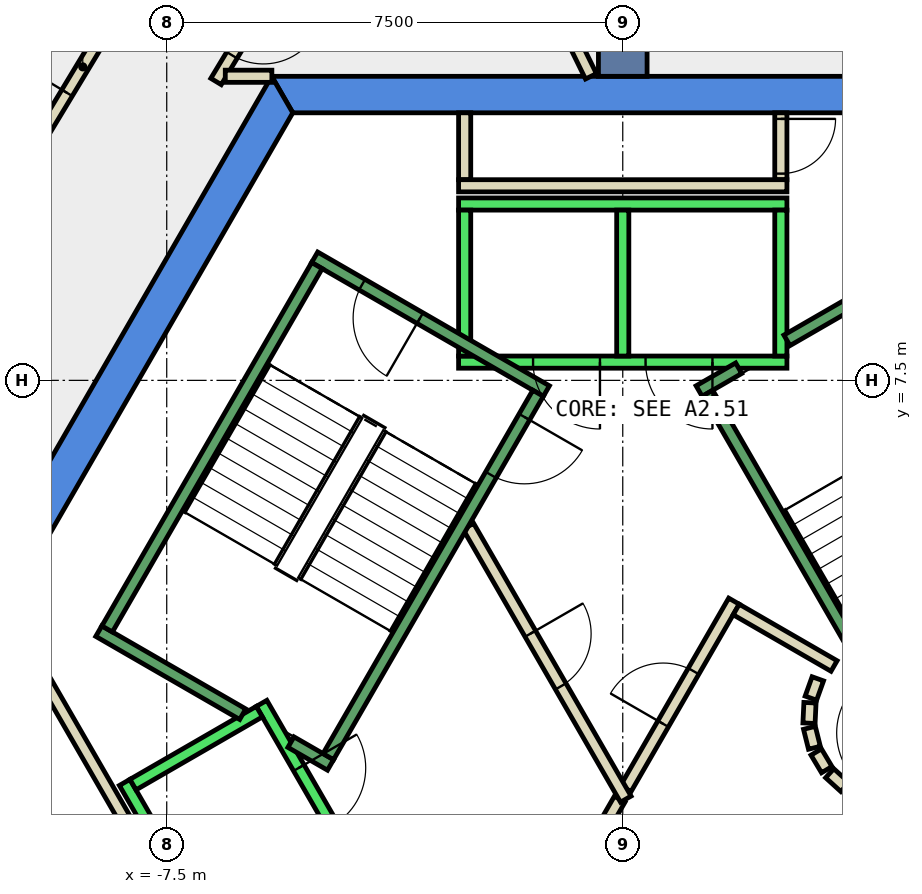
"""IFC4 building model, lengths in metres.
Left out: names, types, materials, properties, quantities, classifications, styles, units other than length and angle.
Written with IfcOpenShell. Run it as: python <this file> out.ifc"""

import sys

from ifc_helpers import new_model, si_unit, direction, frame, frame_2d, origin, place, context, subcontext, project, spatial, polyline, rectangle, outline, extrude, element, fill, save


model = new_model("IFC4")
c1 = context("Model", 3, precision=1e-05, world=origin(), true_north=direction((0.0, 1.0)))
c2 = subcontext(c1, "Body", "Model", "MODEL_VIEW")
j1 = project(units=[si_unit("LENGTHUNIT", "METRE"), si_unit("PLANEANGLEUNIT", "RADIAN")], contexts=[c1])
p1 = place(None, origin())
s1 = spatial("IfcSite", under=j1, at=p1, CompositionType="ELEMENT")
p2 = place(p1, origin())
s2 = spatial("IfcBuilding", under=s1, at=p2, CompositionType="ELEMENT")
p3 = place(p2, frame((0.0, 0.0, 245.0)))
s3 = spatial("IfcBuildingStorey", under=s2, at=p3, CompositionType="ELEMENT", Elevation=245.0)
p4 = place(p3, frame((0.0, 0.0, -0.34)))
e1 = element("IfcWall", 1, at=p4, inside=s3, PredefinedType="SHEAR", context=c2, shape_type="SweptSolid", body=[
    extrude(outline(polyline([(5.774, 12.5), (-5.774, 12.5), (-5.427, 11.9), (5.427, 11.9), (5.774, 12.5)])), origin(), (0.0, 0.0, 1.0), 3.6),
])
p5 = place(p3, frame((0.0, 0.0, -0.34)))
e2 = element("IfcWall", 2, at=p5, inside=s3, PredefinedType="SHEAR", context=c2, shape_type="SweptSolid", body=[
    extrude(outline(polyline([(-10.535, 4.253), (-10.015, 3.953), (-5.427, 11.9), (-5.774, 12.5), (-10.535, 4.253)])), origin(), (0.0, 0.0, 1.0), 3.6),
])
p6 = place(p3, frame((0.0, 0.0, -0.34)))
e3 = element("IfcWall", 3, at=p6, inside=s3, PredefinedType="SHEAR", context=c2, shape_type="SweptSolid", body=[
    extrude(outline(polyline([(-11.547, 2.5), (-5.774, -7.5), (-5.427, -6.9), (-10.854, 2.5), (-11.547, 2.5)])), origin(), (0.0, 0.0, 1.0), 3.6),
])
p7 = place(p3, frame((0.0, 12.5, -0.34), z_axis=(0.0, 0.0, 1.0), x_axis=(0.0, 1.0, 0.0)))
e4 = element("IfcWall", 4, at=p7, inside=s3, PredefinedType="SHEAR", context=c2, shape_type="SweptSolid", body=[
    extrude(rectangle(XDim=9.0, YDim=0.8, at=frame_2d((4.5, 0.0))), origin(), (0.0, 0.0, 1.0), 3.6),
])
p8 = place(p3, frame((-0.523, 12.5, 0.0), z_axis=(0.0, 0.0, 1.0), x_axis=(-0.440503659888, 0.897750814884, 0.0)))
e5 = element("IfcWall", 5, at=p8, inside=s3, PredefinedType="PARTITIONING", context=c2, shape_type="SweptSolid", body=[
    extrude(rectangle(XDim=1.793, YDim=0.2, at=frame_2d((0.897, 0.0))), origin(), (0.0, 0.0, 1.0), 3.26),
])
p9 = place(p3, frame((-5.65, 14.136, 0.0), z_axis=(0.0, 0.0, 1.0), x_axis=(-0.516869099034, -0.856064445275, 0.0)))
e6 = element("IfcWall", 6, at=p9, inside=s3, PredefinedType="PARTITIONING", context=c2, shape_type="SweptSolid", body=[
    extrude(rectangle(XDim=2.01, YDim=0.2, at=frame_2d((1.005, 0.0))), origin(), (0.0, 0.0, 1.0), 3.26),
])
p10 = place(p9, frame((0.505, 0.0, 0.0)))
e7 = element("IfcOpeningElement", 7, at=p10, cuts=e6, PredefinedType="OPENING", context=c2, shape_type="SweptSolid", body=[
    extrude(rectangle(XDim=1.0, YDim=2.1, at=frame_2d((0.5, 1.05))), frame((0.0, 0.11, 0.0), z_axis=(0.0, -1.0, 0.0), x_axis=(1.0, 0.0, 0.0)), (0.0, 0.0, 1.0), 0.22),
])
p11 = place(p3, frame((-6.537, 12.501, 0.0), z_axis=(0.0, 0.0, 1.0), x_axis=(1.0, 0.0, 0.0)))
e8 = element("IfcWall", 8, at=p11, inside=s3, PredefinedType="PARTITIONING", context=c2, shape_type="SweptSolid", body=[
    extrude(rectangle(XDim=0.766, YDim=0.2, at=frame_2d((0.383, 0.0))), origin(), (0.0, 0.0, 1.0), 3.26),
])
p12 = place(p3, frame((-10.576, 9.849, 0.0), z_axis=(0.0, 0.0, 1.0), x_axis=(0.517026085378, 0.855969641423, 0.0)))
e9 = element("IfcWall", 9, at=p12, inside=s3, PredefinedType="PARTITIONING", context=c2, shape_type="SweptSolid", body=[
    extrude(rectangle(XDim=6.408, YDim=0.2, at=frame_2d((3.204, 0.0))), origin(), (0.0, 0.0, 1.0), 3.26),
])
p13 = place(p12, frame((2.779, 0.0, 0.0)))
e10 = element("IfcOpeningElement", 10, at=p13, cuts=e9, PredefinedType="OPENING", context=c2, shape_type="SweptSolid", body=[
    extrude(rectangle(XDim=1.0, YDim=2.1, at=frame_2d((0.5, 1.05))), frame((0.0, 0.11, 0.0), z_axis=(0.0, -1.0, 0.0), x_axis=(1.0, 0.0, 0.0)), (0.0, 0.0, 1.0), 0.22),
])
p14 = place(p3, frame((-2.6, 10.8, 0.0), z_axis=(0.0, 0.0, 1.0), x_axis=(0.0, 1.0, 0.0)))
e11 = element("IfcWall", 11, at=p14, inside=s3, PredefinedType="PARTITIONING", context=c2, shape_type="SweptSolid", body=[
    extrude(rectangle(XDim=1.1, YDim=0.2, at=frame_2d((0.55, 0.0))), origin(), (0.0, 0.0, 1.0), 3.26),
])
p15 = place(p3, frame((2.6, 11.9, 0.0), z_axis=(0.0, 0.0, 1.0), x_axis=(0.0, -1.0, 0.0)))
e12 = element("IfcWall", 12, at=p15, inside=s3, PredefinedType="PARTITIONING", context=c2, shape_type="SweptSolid", body=[
    extrude(rectangle(XDim=1.1, YDim=0.2, at=frame_2d((0.55, 0.0))), origin(), (0.0, 0.0, 1.0), 3.26),
])
p16 = place(p15, frame((0.1, 0.0, 0.0)))
e13 = element("IfcOpeningElement", 13, at=p16, cuts=e12, PredefinedType="OPENING", context=c2, shape_type="SweptSolid", body=[
    extrude(rectangle(XDim=0.9, YDim=2.1, at=frame_2d((0.45, 1.05))), frame((0.0, 0.11, 0.0), z_axis=(0.0, -1.0, 0.0), x_axis=(1.0, 0.0, 0.0)), (0.0, 0.0, 1.0), 0.22),
])
p17 = place(p3, frame((2.7, 10.7, 0.0), z_axis=(0.0, 0.0, 1.0), x_axis=(-1.0, 0.0, 0.0)))
e14 = element("IfcWall", 14, at=p17, inside=s3, PredefinedType="PARTITIONING", context=c2, shape_type="SweptSolid", body=[
    extrude(rectangle(XDim=5.4, YDim=0.2, at=frame_2d((2.7, 0.0))), origin(), (0.0, 0.0, 1.0), 3.26),
])
p18 = place(p3, frame((-9.751, 2.99, 0.0), z_axis=(0.0, 0.0, 1.0), x_axis=(0.500012163284, -0.866018381195, 0.0)))
e15 = element("IfcWall", 15, at=p18, inside=s3, PredefinedType="PARTITIONING", context=c2, shape_type="SweptSolid", body=[
    extrude(rectangle(XDim=8.0, YDim=0.2, at=frame_2d((4.0, 0.0))), origin(), (0.0, 0.0, 1.0), 3.26),
])
p19 = place(p3, frame((-0.982, -1.0, 0.0), z_axis=(0.0, 0.0, 1.0), x_axis=(0.50024047865, 0.865886518847, 0.0)))
e16 = element("IfcWall", 16, at=p19, inside=s3, PredefinedType="PARTITIONING", context=c2, shape_type="SweptSolid", body=[
    extrude(rectangle(XDim=1.863, YDim=0.2, at=frame_2d((0.931, 0.0))), origin(), (0.0, 0.0, 1.0), 3.26),
])
p20 = place(p3, frame((0.05, 0.787, 0.0), z_axis=(0.0, 0.0, 1.0), x_axis=(0.499954076797, 0.866051915934, 0.0)))
e17 = element("IfcWall", 17, at=p20, inside=s3, PredefinedType="PARTITIONING", context=c2, shape_type="SweptSolid", body=[
    extrude(rectangle(XDim=3.558, YDim=0.2, at=frame_2d((1.779, 0.0))), origin(), (0.0, 0.0, 1.0), 3.26),
])
p21 = place(p20, frame((1.229, 0.0, 0.0)))
e18 = element("IfcOpeningElement", 18, at=p21, cuts=e17, PredefinedType="OPENING", context=c2, shape_type="SweptSolid", body=[
    extrude(rectangle(XDim=1.0, YDim=2.1, at=frame_2d((0.5, 1.05))), frame((0.0, 0.11, 0.0), z_axis=(0.0, -1.0, 0.0), x_axis=(1.0, 0.0, 0.0)), (0.0, 0.0, 1.0), 0.22),
])
p22 = place(p3, frame((1.866, 3.732, 0.0), z_axis=(0.0, 0.0, 1.0), x_axis=(0.866043361281, -0.499968895414, 0.0)))
e19 = element("IfcWall", 19, at=p22, inside=s3, PredefinedType="PARTITIONING", context=c2, shape_type="SweptSolid", body=[
    extrude(rectangle(XDim=1.858, YDim=0.2, at=frame_2d((0.929, 0.0))), origin(), (0.0, 0.0, 1.0), 3.26),
])
p23 = place(p3, frame((3.208, 2.592, 0.0), z_axis=(0.0, 0.0, 1.0), x_axis=(-0.337388820924, -0.941365382578, 0.0)))
e20 = element("IfcWall", 20, at=p23, inside=s3, PredefinedType="PARTITIONING", context=c2, shape_type="SweptSolid", body=[
    extrude(rectangle(XDim=0.338, YDim=0.2, at=frame_2d((0.169, 0.0))), origin(), (0.0, 0.0, 1.0), 3.26),
])
p24 = place(p3, frame((3.079, 2.199, 0.0), z_axis=(0.0, 0.0, 1.0), x_axis=(-0.047771483479, -0.998858290933, 0.0)))
e21 = element("IfcWall", 21, at=p24, inside=s3, PredefinedType="PARTITIONING", context=c2, shape_type="SweptSolid", body=[
    extrude(rectangle(XDim=0.337, YDim=0.2, at=frame_2d((0.169, 0.0))), origin(), (0.0, 0.0, 1.0), 3.26),
])
p25 = place(p3, frame((3.07, 1.786, 0.0), z_axis=(0.0, 0.0, 1.0), x_axis=(0.242705583207, -0.970099994784, 0.0)))
e22 = element("IfcWall", 22, at=p25, inside=s3, PredefinedType="PARTITIONING", context=c2, shape_type="SweptSolid", body=[
    extrude(rectangle(XDim=0.338, YDim=0.2, at=frame_2d((0.169, 0.0))), origin(), (0.0, 0.0, 1.0), 3.26),
])
for number, where, z_axis, x_axis in (
    (23, (3.182, 1.388, 0.0), (0.0, 0.0, 1.0), (0.512, -0.859, 0.0)),
    (24, (3.404, 1.039, 0.0), (0.0, 0.0, 1.0), (0.74, -0.672, 0.0)),
):
    element("IfcWall", number, at=place(p3, frame(where, z_axis=z_axis, x_axis=x_axis)), inside=s3, PredefinedType="PARTITIONING", context=c2, shape_type="SweptSolid", body=[
        extrude(rectangle(XDim=0.338, YDim=0.2, at=frame_2d((0.169, 0.0))), origin(), (0.0, 0.0, 1.0), 3.26),
    ])
p26 = place(p3, frame((-2.54, 5.1, 0.0), z_axis=(0.0, 0.0, 1.0), x_axis=(0.499925051871, -0.866068670783, 0.0)))
e25 = element("IfcWall", 25, at=p26, inside=s3, PredefinedType="PARTITIONING", context=c2, shape_type="SweptSolid", body=[
    extrude(rectangle(XDim=5.181, YDim=0.2, at=frame_2d((2.59, 0.0))), origin(), (0.0, 0.0, 1.0), 3.26),
])
p27 = place(p26, frame((2.04, 0.0, 0.0)))
e26 = element("IfcOpeningElement", 26, at=p27, cuts=e25, PredefinedType="OPENING", context=c2, shape_type="SweptSolid", body=[
    extrude(rectangle(XDim=1.0, YDim=2.1, at=frame_2d((0.5, 1.05))), frame((0.0, 0.11, 0.0), z_axis=(0.0, -1.0, 0.0), x_axis=(1.0, 0.0, 0.0)), (0.0, 0.0, 1.0), 0.22),
])
p28 = place(p3, frame((2.7, 7.8, 0.0), z_axis=(0.0, 0.0, 1.0), x_axis=(-1.0, 0.0, 0.0)))
e27 = element("IfcWall", 27, at=p28, inside=s3, PredefinedType="STANDARD", context=c2, shape_type="SweptSolid", body=[
    extrude(rectangle(XDim=5.4, YDim=0.2, at=frame_2d((2.7, 0.0))), origin(), (0.0, 0.0, 1.0), 3.26),
])
p29 = place(p28, frame((1.225, 0.0, 0.0)))
e28 = element("IfcOpeningElement", 28, at=p29, cuts=e27, PredefinedType="OPENING", context=c2, shape_type="SweptSolid", body=[
    extrude(rectangle(XDim=1.1, YDim=2.1, at=frame_2d((0.55, 1.05))), frame((0.0, 0.11, 0.0), z_axis=(0.0, -1.0, 0.0), x_axis=(1.0, 0.0, 0.0)), (0.0, 0.0, 1.0), 0.22),
])
p30 = place(p28, frame((3.075, 0.0, 0.0)))
e29 = element("IfcOpeningElement", 29, at=p30, cuts=e27, PredefinedType="OPENING", context=c2, shape_type="SweptSolid", body=[
    extrude(rectangle(XDim=1.1, YDim=2.1, at=frame_2d((0.55, 1.05))), frame((0.0, 0.11, 0.0), z_axis=(0.0, -1.0, 0.0), x_axis=(1.0, 0.0, 0.0)), (0.0, 0.0, 1.0), 0.22),
])
p31 = place(p3, frame((2.7, 10.4, 0.0), z_axis=(0.0, 0.0, 1.0), x_axis=(-1.0, 0.0, 0.0)))
e30 = element("IfcWall", 30, at=p31, inside=s3, PredefinedType="STANDARD", context=c2, shape_type="SweptSolid", body=[
    extrude(rectangle(XDim=5.4, YDim=0.2, at=frame_2d((2.7, 0.0))), origin(), (0.0, 0.0, 1.0), 3.26),
])
for number, where, z_axis, x_axis in (
    (31, (2.6, 7.9, 0.0), (0.0, 0.0, 1.0), (0.0, 1.0, 0.0)),
    (32, (0.0, 7.9, 0.0), (0.0, 0.0, 1.0), (0.0, 1.0, 0.0)),
    (33, (-2.6, 7.9, 0.0), (0.0, 0.0, 1.0), (0.0, 1.0, 0.0)),
):
    element("IfcWall", number, at=place(p3, frame(where, z_axis=z_axis, x_axis=x_axis)), inside=s3, PredefinedType="STANDARD", context=c2, shape_type="SweptSolid", body=[
        extrude(rectangle(XDim=2.4, YDim=0.2, at=frame_2d((1.2, 0.0))), origin(), (0.0, 0.0, 1.0), 3.26),
    ])
p32 = place(p3, frame((-5.94, 2.188, 0.0), z_axis=(0.0, 0.0, 1.0), x_axis=(0.500034260056, -0.866005622828, 0.0)))
e34 = element("IfcWall", 34, at=p32, inside=s3, PredefinedType="STANDARD", context=c2, shape_type="SweptSolid", body=[
    extrude(rectangle(XDim=5.399, YDim=0.2, at=frame_2d((2.7, 0.0))), origin(), (0.0, 0.0, 1.0), 3.26),
])
p33 = place(p32, frame((3.075, 0.0, 0.0)))
e35 = element("IfcOpeningElement", 35, at=p33, cuts=e34, PredefinedType="OPENING", context=c2, shape_type="SweptSolid", body=[
    extrude(rectangle(XDim=1.1, YDim=2.1, at=frame_2d((0.55, 1.05))), frame((0.0, 0.11, 0.0), z_axis=(0.0, -1.0, 0.0), x_axis=(1.0, 0.0, 0.0)), (0.0, 0.0, 1.0), 0.22),
])
p34 = place(p32, frame((1.225, 0.0, 0.0)))
e36 = element("IfcOpeningElement", 36, at=p34, cuts=e34, PredefinedType="OPENING", context=c2, shape_type="SweptSolid", body=[
    extrude(rectangle(XDim=1.1, YDim=2.1, at=frame_2d((0.55, 1.05))), frame((0.0, 0.11, 0.0), z_axis=(0.0, -1.0, 0.0), x_axis=(1.0, 0.0, 0.0)), (0.0, 0.0, 1.0), 0.22),
])
p35 = place(p3, frame((-8.192, 0.888, 0.0), z_axis=(0.0, 0.0, 1.0), x_axis=(0.500034260056, -0.866005622828, 0.0)))
e37 = element("IfcWall", 37, at=p35, inside=s3, PredefinedType="STANDARD", context=c2, shape_type="SweptSolid", body=[
    extrude(rectangle(XDim=5.399, YDim=0.2, at=frame_2d((2.7, 0.0))), origin(), (0.0, 0.0, 1.0), 3.26),
])
p36 = place(p3, frame((-5.977, 2.052, 0.0), z_axis=(0.0, 0.0, 1.0), x_axis=(-0.865973769406, -0.500089422704, 0.0)))
e38 = element("IfcWall", 38, at=p36, inside=s3, PredefinedType="STANDARD", context=c2, shape_type="SweptSolid", body=[
    extrude(rectangle(XDim=2.399, YDim=0.2, at=frame_2d((1.2, 0.0))), origin(), (0.0, 0.0, 1.0), 3.26),
])
p37 = place(p3, frame((3.24, -2.488, 0.0), z_axis=(0.0, 0.0, 1.0), x_axis=(0.500034260056, 0.866005622828, 0.0)))
e39 = element("IfcWall", 39, at=p37, inside=s3, PredefinedType="STANDARD", context=c2, shape_type="SweptSolid", body=[
    extrude(rectangle(XDim=5.399, YDim=0.2, at=frame_2d((2.7, 0.0))), origin(), (0.0, 0.0, 1.0), 3.26),
])
p38 = place(p37, frame((3.225, 0.0, 0.0)))
e40 = element("IfcOpeningElement", 40, at=p38, cuts=e39, PredefinedType="OPENING", context=c2, shape_type="SweptSolid", body=[
    extrude(rectangle(XDim=1.1, YDim=2.1, at=frame_2d((0.55, 1.05))), frame((0.0, 0.11, 0.0), z_axis=(0.0, -1.0, 0.0), x_axis=(1.0, 0.0, 0.0)), (0.0, 0.0, 1.0), 0.22),
])
p39 = place(p37, frame((1.225, 0.0, 0.0)))
e41 = element("IfcOpeningElement", 41, at=p39, cuts=e39, PredefinedType="OPENING", context=c2, shape_type="SweptSolid", body=[
    extrude(rectangle(XDim=1.1, YDim=2.1, at=frame_2d((0.55, 1.05))), frame((0.0, 0.11, 0.0), z_axis=(0.0, -1.0, 0.0), x_axis=(1.0, 0.0, 0.0)), (0.0, 0.0, 1.0), 0.22),
])
p40 = place(p3, frame((2.7, 8.158, 0.0), z_axis=(0.0, 0.0, 1.0), x_axis=(0.86611865017, 0.499838457731, 0.0)))
e42 = element("IfcWall", 42, at=p40, inside=s3, PredefinedType="STANDARD", context=c2, shape_type="SweptSolid", body=[
    extrude(rectangle(XDim=2.733, YDim=0.2, at=frame_2d((1.366, 0.0))), origin(), (0.0, 0.0, 1.0), 3.26),
])
p41 = place(p3, frame((1.256, 7.324, 0.0), z_axis=(0.0, 0.0, 1.0), x_axis=(0.865915093549, 0.500191014278, 0.0)))
e43 = element("IfcWall", 43, at=p41, inside=s3, PredefinedType="STANDARD", context=c2, shape_type="SweptSolid", body=[
    extrude(rectangle(XDim=0.752, YDim=0.2, at=frame_2d((0.376, 0.0))), origin(), (0.0, 0.0, 1.0), 3.26),
])
p42 = place(p3, frame((4.843, 1.312, 0.0), z_axis=(0.0, 0.0, 1.0), x_axis=(-0.499963383562, 0.866046543262, 0.0)))
e44 = element("IfcWall", 44, at=p42, inside=s3, PredefinedType="STANDARD", context=c2, shape_type="SweptSolid", body=[
    extrude(rectangle(XDim=6.9, YDim=0.2, at=frame_2d((3.45, 0.0))), origin(), (0.0, 0.0, 1.0), 3.26),
])
p43 = place(p42, frame((0.45, 0.0, 0.0)))
e45 = element("IfcOpeningElement", 45, at=p43, cuts=e44, PredefinedType="OPENING", context=c2, shape_type="SweptSolid", body=[
    extrude(rectangle(XDim=1.1, YDim=2.2, at=frame_2d((0.55, 1.1))), frame((0.0, 0.11, 0.0), z_axis=(0.0, -1.0, 0.0), x_axis=(1.0, 0.0, 0.0)), (0.0, 0.0, 1.0), 0.22),
])
p44 = place(p3, frame((-1.256, 7.324, 0.0), z_axis=(0.0, 0.0, 1.0), x_axis=(-0.866046073146, 0.499964197906, 0.0)))
e46 = element("IfcWall", 46, at=p44, inside=s3, PredefinedType="STANDARD", context=c2, shape_type="SweptSolid", body=[
    extrude(rectangle(XDim=4.4, YDim=0.2, at=frame_2d((2.2, 0.0))), origin(), (0.0, 0.0, 1.0), 3.26),
])
p45 = place(p44, frame((2.4, 0.0, 0.0)))
e47 = element("IfcOpeningElement", 47, at=p45, cuts=e46, PredefinedType="OPENING", context=c2, shape_type="SweptSolid", body=[
    extrude(rectangle(XDim=1.1, YDim=2.2, at=frame_2d((0.55, 1.1))), frame((0.0, 0.11, 0.0), z_axis=(0.0, -1.0, 0.0), x_axis=(1.0, 0.0, 0.0)), (0.0, 0.0, 1.0), 0.22),
])
p46 = place(p3, frame((-6.25, 2.01, 0.0), z_axis=(0.0, 0.0, 1.0), x_axis=(-0.86611865017, 0.499838457731, 0.0)))
e48 = element("IfcWall", 48, at=p46, inside=s3, PredefinedType="STANDARD", context=c2, shape_type="SweptSolid", body=[
    extrude(rectangle(XDim=2.733, YDim=0.2, at=frame_2d((1.366, 0.0))), origin(), (0.0, 0.0, 1.0), 3.26),
])
p47 = place(p3, frame((-4.806, 1.176, 0.0), z_axis=(0.0, 0.0, 1.0), x_axis=(-0.866558586415, 0.499075361355, 0.0)))
e49 = element("IfcWall", 49, at=p47, inside=s3, PredefinedType="STANDARD", context=c2, shape_type="SweptSolid", body=[
    extrude(rectangle(XDim=0.751, YDim=0.2, at=frame_2d((0.376, 0.0))), origin(), (0.0, 0.0, 1.0), 3.26),
])
p48 = place(p3, frame((-1.393, 7.288, 0.0), z_axis=(0.0, 0.0, 1.0), x_axis=(-0.499963383562, -0.866046543262, 0.0)))
e50 = element("IfcWall", 50, at=p48, inside=s3, PredefinedType="STANDARD", context=c2, shape_type="SweptSolid", body=[
    extrude(rectangle(XDim=6.9, YDim=0.2, at=frame_2d((3.45, 0.0))), origin(), (0.0, 0.0, 1.0), 3.26),
])
p49 = place(p48, frame((0.45, 0.0, 0.0)))
e51 = element("IfcOpeningElement", 51, at=p49, cuts=e50, PredefinedType="OPENING", context=c2, shape_type="SweptSolid", body=[
    extrude(rectangle(XDim=1.1, YDim=2.2, at=frame_2d((0.55, 1.1))), frame((0.0, 0.11, 0.0), z_axis=(0.0, -1.0, 0.0), x_axis=(1.0, 0.0, 0.0)), (0.0, 0.0, 1.0), 0.22),
])
p50 = place(p3, frame((-5.03, 9.388, 0.0), z_axis=(0.0, 0.0, 1.0), x_axis=(-0.499978703459, -0.866037698999, 0.0)))
e52 = element("IfcWall", 52, at=p50, inside=s3, PredefinedType="STANDARD", context=c2, shape_type="SweptSolid", body=[
    extrude(rectangle(XDim=6.9, YDim=0.2, at=frame_2d((3.45, 0.0))), origin(), (0.0, 0.0, 1.0), 3.26),
])
p51 = place(p13, origin())
e53 = element("IfcDoor", 53, at=p51, inside=s3, OperationType="SINGLE_SWING_LEFT", PredefinedType="DOOR", context=c2, shape_type="SweptSolid", body=[
    extrude(rectangle(XDim=1.0, YDim=2.1, at=frame_2d((0.5, 1.05))), frame((0.0, 0.025, 0.0), z_axis=(0.0, -1.0, 0.0), x_axis=(1.0, 0.0, 0.0)), (0.0, 0.0, 1.0), 0.05),
])
fill(e10, e53)
p52 = place(p10, origin())
e54 = element("IfcDoor", 54, at=p52, inside=s3, OperationType="SINGLE_SWING_LEFT", PredefinedType="DOOR", context=c2, shape_type="SweptSolid", body=[
    extrude(rectangle(XDim=1.0, YDim=2.1, at=frame_2d((0.5, 1.05))), frame((0.0, 0.025, 0.0), z_axis=(0.0, -1.0, 0.0), x_axis=(1.0, 0.0, 0.0)), (0.0, 0.0, 1.0), 0.05),
])
fill(e7, e54)
p53 = place(p21, origin())
e55 = element("IfcDoor", 55, at=p53, inside=s3, OperationType="SINGLE_SWING_RIGHT", PredefinedType="DOOR", context=c2, shape_type="SweptSolid", body=[
    extrude(rectangle(XDim=1.0, YDim=2.1, at=frame_2d((0.5, 1.05))), frame((0.0, 0.025, 0.0), z_axis=(0.0, -1.0, 0.0), x_axis=(1.0, 0.0, 0.0)), (0.0, 0.0, 1.0), 0.05),
])
fill(e18, e55)
p54 = place(p27, origin())
e56 = element("IfcDoor", 56, at=p54, inside=s3, OperationType="SINGLE_SWING_RIGHT", PredefinedType="DOOR", context=c2, shape_type="SweptSolid", body=[
    extrude(rectangle(XDim=1.0, YDim=2.1, at=frame_2d((0.5, 1.05))), frame((0.0, 0.025, 0.0), z_axis=(0.0, -1.0, 0.0), x_axis=(1.0, 0.0, 0.0)), (0.0, 0.0, 1.0), 0.05),
])
fill(e26, e56)
p55 = place(p16, origin())
e57 = element("IfcDoor", 57, at=p55, inside=s3, OperationType="SINGLE_SWING_LEFT", PredefinedType="DOOR", context=c2, shape_type="SweptSolid", body=[
    extrude(rectangle(XDim=0.9, YDim=2.1, at=frame_2d((0.45, 1.05))), frame((0.0, 0.025, 0.0), z_axis=(0.0, -1.0, 0.0), x_axis=(1.0, 0.0, 0.0)), (0.0, 0.0, 1.0), 0.05),
])
fill(e13, e57)
p56 = place(p29, origin())
e58 = element("IfcDoor", 58, at=p56, inside=s3, OperationType="SLIDING_TO_LEFT", PredefinedType="DOOR", context=c2, shape_type="SweptSolid", body=[
    extrude(rectangle(XDim=1.1, YDim=2.1, at=frame_2d((0.55, 1.05))), frame((0.0, 0.025, 0.0), z_axis=(0.0, -1.0, 0.0), x_axis=(1.0, 0.0, 0.0)), (0.0, 0.0, 1.0), 0.05),
])
fill(e28, e58)
p57 = place(p30, origin())
e59 = element("IfcDoor", 59, at=p57, inside=s3, OperationType="SLIDING_TO_LEFT", PredefinedType="DOOR", context=c2, shape_type="SweptSolid", body=[
    extrude(rectangle(XDim=1.1, YDim=2.1, at=frame_2d((0.55, 1.05))), frame((0.0, 0.025, 0.0), z_axis=(0.0, -1.0, 0.0), x_axis=(1.0, 0.0, 0.0)), (0.0, 0.0, 1.0), 0.05),
])
fill(e29, e59)
p58 = place(p34, origin())
e60 = element("IfcDoor", 60, at=p58, inside=s3, OperationType="SLIDING_TO_LEFT", PredefinedType="DOOR", context=c2, shape_type="SweptSolid", body=[
    extrude(rectangle(XDim=1.1, YDim=2.1, at=frame_2d((0.55, 1.05))), frame((0.0, 0.025, 0.0), z_axis=(0.0, -1.0, 0.0), x_axis=(1.0, 0.0, 0.0)), (0.0, 0.0, 1.0), 0.05),
])
fill(e36, e60)
p59 = place(p49, origin())
e61 = element("IfcDoor", 61, at=p59, inside=s3, OperationType="SINGLE_SWING_LEFT", PredefinedType="DOOR", context=c2, shape_type="SweptSolid", body=[
    extrude(rectangle(XDim=1.1, YDim=2.2, at=frame_2d((0.55, 1.1))), frame((0.0, 0.025, 0.0), z_axis=(0.0, -1.0, 0.0), x_axis=(1.0, 0.0, 0.0)), (0.0, 0.0, 1.0), 0.05),
])
fill(e51, e61)
p60 = place(p45, origin())
e62 = element("IfcDoor", 62, at=p60, inside=s3, OperationType="SINGLE_SWING_LEFT", PredefinedType="DOOR", context=c2, shape_type="SweptSolid", body=[
    extrude(rectangle(XDim=1.1, YDim=2.2, at=frame_2d((0.55, 1.1))), frame((0.0, 0.025, 0.0), z_axis=(0.0, -1.0, 0.0), x_axis=(1.0, 0.0, 0.0)), (0.0, 0.0, 1.0), 0.05),
])
fill(e47, e62)
save(model, sys.argv[1])
